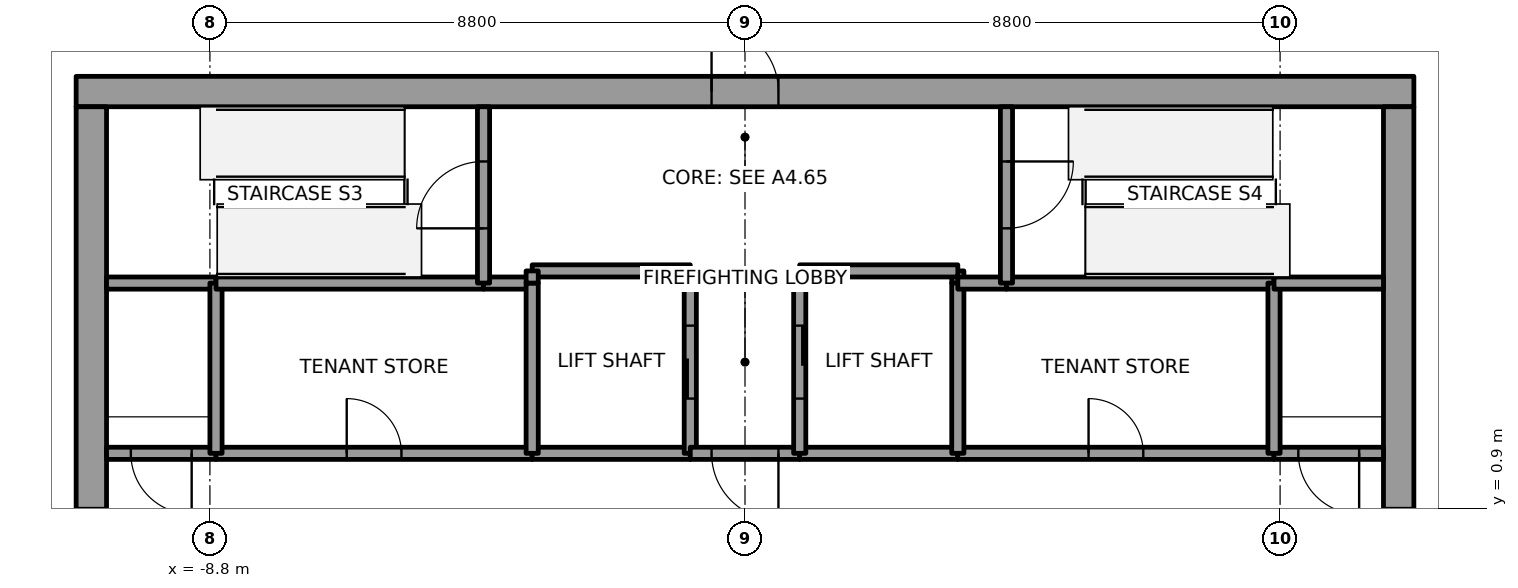
"""IFC4 building model, lengths in metres.
Left out: names, types, materials, properties, quantities, classifications, styles, units other than length and angle.
Written with IfcOpenShell. Run it as: python <this file> out.ifc"""

import sys

from ifc_helpers import new_model, si_unit, direction, frame, frame_2d, origin, place, context, subcontext, project, spatial, rectangle, extrude, element, fill, save


model = new_model("IFC4")
c1 = context("Model", 3, precision=1e-05, world=origin(), true_north=direction((0.0, 1.0)))
c2 = subcontext(c1, "Body", "Model", "MODEL_VIEW")
j1 = project(units=[si_unit("LENGTHUNIT", "METRE"), si_unit("PLANEANGLEUNIT", "RADIAN")], contexts=[c1])
p1 = place(None, origin())
s1 = spatial("IfcSite", under=j1, at=p1, CompositionType="ELEMENT")
p2 = place(p1, origin())
s2 = spatial("IfcBuilding", under=s1, at=p2, CompositionType="ELEMENT")
p3 = place(p2, frame((0.0, 0.0, 279.0)))
s3 = spatial("IfcBuildingStorey", under=s2, at=p3, CompositionType="ELEMENT", Elevation=279.0)
p4 = place(p3, frame((-11.0, 7.75, 0.0), z_axis=(0.0, 0.0, 1.0), x_axis=(1.0, 0.0, 0.0)))
e1 = element("IfcWall", 1, at=p4, inside=s3, PredefinedType="SHEAR", context=c2, shape_type="SweptSolid", body=[
    extrude(rectangle(XDim=22.0, YDim=0.5, at=frame_2d((11.0, 0.0))), origin(), (0.0, 0.0, 1.0), 4.0),
])
p5 = place(p4, frame((10.45, 0.0, 0.0)))
e2 = element("IfcOpeningElement", 2, at=p5, cuts=e1, PredefinedType="OPENING", context=c2, shape_type="SweptSolid", body=[
    extrude(rectangle(XDim=1.1, YDim=2.1, at=frame_2d((0.55, 1.05))), frame((0.0, 0.25, 0.0), z_axis=(0.0, -1.0, 0.0), x_axis=(1.0, 0.0, 0.0)), (0.0, 0.0, 1.0), 0.5),
])
p6 = place(p3, frame((-10.75, -7.5, 0.0), z_axis=(0.0, 0.0, 1.0), x_axis=(0.0, 1.0, 0.0)))
e3 = element("IfcWall", 3, at=p6, inside=s3, PredefinedType="SHEAR", context=c2, shape_type="SweptSolid", body=[
    extrude(rectangle(XDim=15.0, YDim=0.5, at=frame_2d((7.5, 0.0))), origin(), (0.0, 0.0, 1.0), 4.0),
])
p7 = place(p6, frame((6.6, 0.0, 0.0)))
e4 = element("IfcOpeningElement", 4, at=p7, cuts=e3, PredefinedType="OPENING", context=c2, shape_type="SweptSolid", body=[
    extrude(rectangle(XDim=1.8, YDim=2.1, at=frame_2d((0.9, 1.05))), frame((0.0, 0.25, 0.0), z_axis=(0.0, -1.0, 0.0), x_axis=(1.0, 0.0, 0.0)), (0.0, 0.0, 1.0), 0.5),
])
p8 = place(p3, frame((10.75, -7.5, 0.0), z_axis=(0.0, 0.0, 1.0), x_axis=(0.0, 1.0, 0.0)))
e5 = element("IfcWall", 5, at=p8, inside=s3, PredefinedType="SHEAR", context=c2, shape_type="SweptSolid", body=[
    extrude(rectangle(XDim=15.0, YDim=0.5, at=frame_2d((7.5, 0.0))), origin(), (0.0, 0.0, 1.0), 4.0),
])
p9 = place(p8, frame((6.6, 0.0, 0.0)))
e6 = element("IfcOpeningElement", 6, at=p9, cuts=e5, PredefinedType="OPENING", context=c2, shape_type="SweptSolid", body=[
    extrude(rectangle(XDim=1.8, YDim=2.1, at=frame_2d((0.9, 1.05))), frame((0.0, 0.25, 0.0), z_axis=(0.0, -1.0, 0.0), x_axis=(1.0, 0.0, 0.0)), (0.0, 0.0, 1.0), 0.5),
])
p10 = place(p3, frame((-8.7, 1.8, 0.0), z_axis=(0.0, 0.0, 1.0), x_axis=(-1.0, 0.0, 0.0)))
e7 = element("IfcWall", 7, at=p10, inside=s3, PredefinedType="SOLIDWALL", context=c2, shape_type="SweptSolid", body=[
    extrude(rectangle(XDim=1.8, YDim=0.2, at=frame_2d((0.9, 0.0))), origin(), (0.0, 0.0, 1.0), 3.85),
])
p11 = place(p10, frame((0.4, 0.0, 0.0)))
e8 = element("IfcOpeningElement", 8, at=p11, cuts=e7, PredefinedType="OPENING", context=c2, shape_type="SweptSolid", body=[
    extrude(rectangle(XDim=1.0, YDim=2.1, at=frame_2d((0.5, 1.05))), frame((0.0, 0.1, 0.0), z_axis=(0.0, -1.0, 0.0), x_axis=(1.0, 0.0, 0.0)), (0.0, 0.0, 1.0), 0.2),
])
p12 = place(p3, frame((-8.7, 4.6, 0.0), z_axis=(0.0, 0.0, 1.0), x_axis=(-1.0, 0.0, 0.0)))
e9 = element("IfcWall", 9, at=p12, inside=s3, PredefinedType="SOLIDWALL", context=c2, shape_type="SweptSolid", body=[
    extrude(rectangle(XDim=1.8, YDim=0.2, at=frame_2d((0.9, 0.0))), origin(), (0.0, 0.0, 1.0), 3.85),
])
p13 = place(p3, frame((-8.7, 1.8, 0.0), z_axis=(0.0, 0.0, 1.0), x_axis=(1.0, 0.0, 0.0)))
e10 = element("IfcWall", 10, at=p13, inside=s3, PredefinedType="SOLIDWALL", context=c2, shape_type="SweptSolid", body=[
    extrude(rectangle(XDim=5.2, YDim=0.2, at=frame_2d((2.6, 0.0))), origin(), (0.0, 0.0, 1.0), 3.85),
])
p14 = place(p13, frame((2.15, 0.0, 0.0)))
e11 = element("IfcOpeningElement", 11, at=p14, cuts=e10, PredefinedType="OPENING", context=c2, shape_type="SweptSolid", body=[
    extrude(rectangle(XDim=0.9, YDim=2.1, at=frame_2d((0.45, 1.05))), frame((0.0, 0.1, 0.0), z_axis=(0.0, -1.0, 0.0), x_axis=(1.0, 0.0, 0.0)), (0.0, 0.0, 1.0), 0.2),
])
p15 = place(p3, frame((-8.7, 4.6, 0.0), z_axis=(0.0, 0.0, 1.0), x_axis=(0.0, -1.0, 0.0)))
e12 = element("IfcWall", 12, at=p15, inside=s3, PredefinedType="SOLIDWALL", context=c2, shape_type="SweptSolid", body=[
    extrude(rectangle(XDim=2.8, YDim=0.2, at=frame_2d((1.4, 0.0))), origin(), (0.0, 0.0, 1.0), 3.85),
])
p16 = place(p3, frame((-4.3, 4.6, 0.0), z_axis=(0.0, 0.0, 1.0), x_axis=(-1.0, 0.0, 0.0)))
e13 = element("IfcWall", 13, at=p16, inside=s3, PredefinedType="SOLIDWALL", context=c2, shape_type="SweptSolid", body=[
    extrude(rectangle(XDim=4.4, YDim=0.2, at=frame_2d((2.2, 0.0))), origin(), (0.0, 0.0, 1.0), 3.85),
])
p17 = place(p3, frame((-3.5, 4.6, 0.0), z_axis=(0.0, 0.0, 1.0), x_axis=(-1.0, 0.0, 0.0)))
e14 = element("IfcWall", 14, at=p17, inside=s3, PredefinedType="SOLIDWALL", context=c2, shape_type="SweptSolid", body=[
    extrude(rectangle(XDim=0.8, YDim=0.2, at=frame_2d((0.4, 0.0))), origin(), (0.0, 0.0, 1.0), 3.85),
])
p18 = place(p3, frame((-4.3, 4.6, 0.0), z_axis=(0.0, 0.0, 1.0), x_axis=(0.0, 1.0, 0.0)))
e15 = element("IfcWall", 15, at=p18, inside=s3, PredefinedType="SOLIDWALL", context=c2, shape_type="SweptSolid", body=[
    extrude(rectangle(XDim=2.9, YDim=0.2, at=frame_2d((1.45, 0.0))), origin(), (0.0, 0.0, 1.0), 3.85),
])
p19 = place(p18, frame((0.9, 0.0, 0.0)))
e16 = element("IfcOpeningElement", 16, at=p19, cuts=e15, PredefinedType="OPENING", context=c2, shape_type="SweptSolid", body=[
    extrude(rectangle(XDim=1.1, YDim=2.1, at=frame_2d((0.55, 1.05))), frame((0.0, 0.1, 0.0), z_axis=(0.0, -1.0, 0.0), x_axis=(1.0, 0.0, 0.0)), (0.0, 0.0, 1.0), 0.2),
])
p20 = place(p3, frame((-0.9, 1.8, 0.0), z_axis=(0.0, 0.0, 1.0), x_axis=(-1.0, 0.0, 0.0)))
e17 = element("IfcWall", 17, at=p20, inside=s3, PredefinedType="SOLIDWALL", context=c2, shape_type="SweptSolid", body=[
    extrude(rectangle(XDim=2.6, YDim=0.2, at=frame_2d((1.3, 0.0))), origin(), (0.0, 0.0, 1.0), 3.85),
])
p21 = place(p3, frame((-3.5, 1.8, 0.0), z_axis=(0.0, 0.0, 1.0), x_axis=(0.0, 1.0, 0.0)))
e18 = element("IfcWall", 18, at=p21, inside=s3, PredefinedType="SOLIDWALL", context=c2, shape_type="SweptSolid", body=[
    extrude(rectangle(XDim=2.8, YDim=0.2, at=frame_2d((1.4, 0.0))), origin(), (0.0, 0.0, 1.0), 3.85),
])
p22 = place(p3, frame((-0.9, 1.8, 0.0), z_axis=(0.0, 0.0, 1.0), x_axis=(0.0, 1.0, 0.0)))
e19 = element("IfcWall", 19, at=p22, inside=s3, PredefinedType="SOLIDWALL", context=c2, shape_type="SweptSolid", body=[
    extrude(rectangle(XDim=3.0, YDim=0.2, at=frame_2d((1.5, 0.0))), origin(), (0.0, 0.0, 1.0), 3.85),
])
p23 = place(p22, frame((0.9, 0.0, 0.0)))
e20 = element("IfcOpeningElement", 20, at=p23, cuts=e19, PredefinedType="OPENING", context=c2, shape_type="SweptSolid", body=[
    extrude(rectangle(XDim=1.2, YDim=2.1, at=frame_2d((0.6, 1.05))), frame((0.0, 0.1, 0.0), z_axis=(0.0, -1.0, 0.0), x_axis=(1.0, 0.0, 0.0)), (0.0, 0.0, 1.0), 0.2),
])
p24 = place(p3, frame((-0.9, 4.8, 0.0), z_axis=(0.0, 0.0, 1.0), x_axis=(-1.0, 0.0, 0.0)))
e21 = element("IfcWall", 21, at=p24, inside=s3, PredefinedType="SOLIDWALL", context=c2, shape_type="SweptSolid", body=[
    extrude(rectangle(XDim=2.6, YDim=0.2, at=frame_2d((1.3, 0.0))), origin(), (0.0, 0.0, 1.0), 3.85),
])
p25 = place(p3, frame((-3.5, 4.8, 0.0), z_axis=(0.0, 0.0, 1.0), x_axis=(0.0, -1.0, 0.0)))
e22 = element("IfcWall", 22, at=p25, inside=s3, PredefinedType="SOLIDWALL", context=c2, shape_type="SweptSolid", body=[
    extrude(rectangle(XDim=0.2, YDim=0.2, at=frame_2d((0.1, 0.0))), origin(), (0.0, 0.0, 1.0), 3.85),
])
p26 = place(p3, frame((0.9, 1.8, 0.0), z_axis=(0.0, 0.0, 1.0), x_axis=(-1.0, 0.0, 0.0)))
e23 = element("IfcWall", 23, at=p26, inside=s3, PredefinedType="SOLIDWALL", context=c2, shape_type="SweptSolid", body=[
    extrude(rectangle(XDim=1.8, YDim=0.2, at=frame_2d((0.9, 0.0))), origin(), (0.0, 0.0, 1.0), 3.85),
])
p27 = place(p26, frame((0.35, 0.0, 0.0)))
e24 = element("IfcOpeningElement", 24, at=p27, cuts=e23, PredefinedType="OPENING", context=c2, shape_type="SweptSolid", body=[
    extrude(rectangle(XDim=1.1, YDim=2.1, at=frame_2d((0.55, 1.05))), frame((0.0, 0.1, 0.0), z_axis=(0.0, -1.0, 0.0), x_axis=(1.0, 0.0, 0.0)), (0.0, 0.0, 1.0), 0.2),
])
p28 = place(p3, frame((3.5, 1.8, 0.0), z_axis=(0.0, 0.0, 1.0), x_axis=(-1.0, 0.0, 0.0)))
e25 = element("IfcWall", 25, at=p28, inside=s3, PredefinedType="SOLIDWALL", context=c2, shape_type="SweptSolid", body=[
    extrude(rectangle(XDim=2.6, YDim=0.2, at=frame_2d((1.3, 0.0))), origin(), (0.0, 0.0, 1.0), 3.85),
])
p29 = place(p3, frame((3.5, 4.6, 0.0), z_axis=(0.0, 0.0, 1.0), x_axis=(0.0, 1.0, 0.0)))
e26 = element("IfcWall", 26, at=p29, inside=s3, PredefinedType="SOLIDWALL", context=c2, shape_type="SweptSolid", body=[
    extrude(rectangle(XDim=0.2, YDim=0.2, at=frame_2d((0.1, 0.0))), origin(), (0.0, 0.0, 1.0), 3.85),
])
p30 = place(p3, frame((3.5, 4.8, 0.0), z_axis=(0.0, 0.0, 1.0), x_axis=(-1.0, 0.0, 0.0)))
e27 = element("IfcWall", 27, at=p30, inside=s3, PredefinedType="SOLIDWALL", context=c2, shape_type="SweptSolid", body=[
    extrude(rectangle(XDim=2.6, YDim=0.2, at=frame_2d((1.3, 0.0))), origin(), (0.0, 0.0, 1.0), 3.85),
])
p31 = place(p3, frame((0.9, 4.8, 0.0), z_axis=(0.0, 0.0, 1.0), x_axis=(0.0, -1.0, 0.0)))
e28 = element("IfcWall", 28, at=p31, inside=s3, PredefinedType="SOLIDWALL", context=c2, shape_type="SweptSolid", body=[
    extrude(rectangle(XDim=3.0, YDim=0.2, at=frame_2d((1.5, 0.0))), origin(), (0.0, 0.0, 1.0), 3.85),
])
p32 = place(p31, frame((0.9, 0.0, 0.0)))
e29 = element("IfcOpeningElement", 29, at=p32, cuts=e28, PredefinedType="OPENING", context=c2, shape_type="SweptSolid", body=[
    extrude(rectangle(XDim=1.2, YDim=2.1, at=frame_2d((0.6, 1.05))), frame((0.0, 0.1, 0.0), z_axis=(0.0, -1.0, 0.0), x_axis=(1.0, 0.0, 0.0)), (0.0, 0.0, 1.0), 0.2),
])
p33 = place(p3, frame((3.5, 1.8, 0.0), z_axis=(0.0, 0.0, 1.0), x_axis=(1.0, 0.0, 0.0)))
e30 = element("IfcWall", 30, at=p33, inside=s3, PredefinedType="SOLIDWALL", context=c2, shape_type="SweptSolid", body=[
    extrude(rectangle(XDim=5.2, YDim=0.2, at=frame_2d((2.6, 0.0))), origin(), (0.0, 0.0, 1.0), 3.85),
])
p34 = place(p33, frame((2.15, 0.0, 0.0)))
e31 = element("IfcOpeningElement", 31, at=p34, cuts=e30, PredefinedType="OPENING", context=c2, shape_type="SweptSolid", body=[
    extrude(rectangle(XDim=0.9, YDim=2.1, at=frame_2d((0.45, 1.05))), frame((0.0, 0.1, 0.0), z_axis=(0.0, -1.0, 0.0), x_axis=(1.0, 0.0, 0.0)), (0.0, 0.0, 1.0), 0.2),
])
p35 = place(p3, frame((3.5, 4.6, 0.0), z_axis=(0.0, 0.0, 1.0), x_axis=(0.0, -1.0, 0.0)))
e32 = element("IfcWall", 32, at=p35, inside=s3, PredefinedType="SOLIDWALL", context=c2, shape_type="SweptSolid", body=[
    extrude(rectangle(XDim=2.8, YDim=0.2, at=frame_2d((1.4, 0.0))), origin(), (0.0, 0.0, 1.0), 3.85),
])
p36 = place(p3, frame((4.3, 4.6, 0.0), z_axis=(0.0, 0.0, 1.0), x_axis=(-1.0, 0.0, 0.0)))
e33 = element("IfcWall", 33, at=p36, inside=s3, PredefinedType="SOLIDWALL", context=c2, shape_type="SweptSolid", body=[
    extrude(rectangle(XDim=0.8, YDim=0.2, at=frame_2d((0.4, 0.0))), origin(), (0.0, 0.0, 1.0), 3.85),
])
p37 = place(p3, frame((8.7, 4.6, 0.0), z_axis=(0.0, 0.0, 1.0), x_axis=(-1.0, 0.0, 0.0)))
e34 = element("IfcWall", 34, at=p37, inside=s3, PredefinedType="SOLIDWALL", context=c2, shape_type="SweptSolid", body=[
    extrude(rectangle(XDim=4.4, YDim=0.2, at=frame_2d((2.2, 0.0))), origin(), (0.0, 0.0, 1.0), 3.85),
])
p38 = place(p3, frame((4.3, 7.5, 0.0), z_axis=(0.0, 0.0, 1.0), x_axis=(0.0, -1.0, 0.0)))
e35 = element("IfcWall", 35, at=p38, inside=s3, PredefinedType="SOLIDWALL", context=c2, shape_type="SweptSolid", body=[
    extrude(rectangle(XDim=2.9, YDim=0.2, at=frame_2d((1.45, 0.0))), origin(), (0.0, 0.0, 1.0), 3.85),
])
p39 = place(p38, frame((0.9, 0.0, 0.0)))
e36 = element("IfcOpeningElement", 36, at=p39, cuts=e35, PredefinedType="OPENING", context=c2, shape_type="SweptSolid", body=[
    extrude(rectangle(XDim=1.1, YDim=2.1, at=frame_2d((0.55, 1.05))), frame((0.0, 0.1, 0.0), z_axis=(0.0, -1.0, 0.0), x_axis=(1.0, 0.0, 0.0)), (0.0, 0.0, 1.0), 0.2),
])
p40 = place(p3, frame((10.5, 1.8, 0.0), z_axis=(0.0, 0.0, 1.0), x_axis=(-1.0, 0.0, 0.0)))
e37 = element("IfcWall", 37, at=p40, inside=s3, PredefinedType="SOLIDWALL", context=c2, shape_type="SweptSolid", body=[
    extrude(rectangle(XDim=1.8, YDim=0.2, at=frame_2d((0.9, 0.0))), origin(), (0.0, 0.0, 1.0), 3.85),
])
p41 = place(p40, frame((0.4, 0.0, 0.0)))
e38 = element("IfcOpeningElement", 38, at=p41, cuts=e37, PredefinedType="OPENING", context=c2, shape_type="SweptSolid", body=[
    extrude(rectangle(XDim=1.0, YDim=2.1, at=frame_2d((0.5, 1.05))), frame((0.0, 0.1, 0.0), z_axis=(0.0, -1.0, 0.0), x_axis=(1.0, 0.0, 0.0)), (0.0, 0.0, 1.0), 0.2),
])
p42 = place(p3, frame((8.7, 1.8, 0.0), z_axis=(0.0, 0.0, 1.0), x_axis=(0.0, 1.0, 0.0)))
e39 = element("IfcWall", 39, at=p42, inside=s3, PredefinedType="SOLIDWALL", context=c2, shape_type="SweptSolid", body=[
    extrude(rectangle(XDim=2.8, YDim=0.2, at=frame_2d((1.4, 0.0))), origin(), (0.0, 0.0, 1.0), 3.85),
])
p43 = place(p3, frame((10.5, 4.6, 0.0), z_axis=(0.0, 0.0, 1.0), x_axis=(-1.0, 0.0, 0.0)))
e40 = element("IfcWall", 40, at=p43, inside=s3, PredefinedType="SOLIDWALL", context=c2, shape_type="SweptSolid", body=[
    extrude(rectangle(XDim=1.8, YDim=0.2, at=frame_2d((0.9, 0.0))), origin(), (0.0, 0.0, 1.0), 3.85),
])
p44 = place(p23, origin())
e41 = element("IfcDoor", 41, at=p44, inside=s3, OperationType="SLIDING_TO_LEFT", PredefinedType="DOOR", context=c2, shape_type="SweptSolid", body=[
    extrude(rectangle(XDim=1.2, YDim=2.1, at=frame_2d((0.6, 1.05))), frame((0.0, 0.025, 0.0), z_axis=(0.0, -1.0, 0.0), x_axis=(1.0, 0.0, 0.0)), (0.0, 0.0, 1.0), 0.05),
])
fill(e20, e41)
p45 = place(p32, origin())
e42 = element("IfcDoor", 42, at=p45, inside=s3, OperationType="SLIDING_TO_RIGHT", PredefinedType="DOOR", context=c2, shape_type="SweptSolid", body=[
    extrude(rectangle(XDim=1.2, YDim=2.1, at=frame_2d((0.6, 1.05))), frame((0.0, 0.025, 0.0), z_axis=(0.0, -1.0, 0.0), x_axis=(1.0, 0.0, 0.0)), (0.0, 0.0, 1.0), 0.05),
])
fill(e29, e42)
p46 = place(p27, origin())
e43 = element("IfcDoor", 43, at=p46, inside=s3, OperationType="SINGLE_SWING_LEFT", PredefinedType="DOOR", context=c2, shape_type="SweptSolid", body=[
    extrude(rectangle(XDim=1.1, YDim=2.1, at=frame_2d((0.55, 1.05))), frame((0.0, 0.025, 0.0), z_axis=(0.0, -1.0, 0.0), x_axis=(1.0, 0.0, 0.0)), (0.0, 0.0, 1.0), 0.05),
])
fill(e24, e43)
p47 = place(p11, origin())
e44 = element("IfcDoor", 44, at=p47, inside=s3, OperationType="SINGLE_SWING_RIGHT", PredefinedType="DOOR", context=c2, shape_type="SweptSolid", body=[
    extrude(rectangle(XDim=1.0, YDim=2.1, at=frame_2d((0.5, 1.05))), frame((0.0, 0.025, 0.0), z_axis=(0.0, -1.0, 0.0), x_axis=(1.0, 0.0, 0.0)), (0.0, 0.0, 1.0), 0.05),
])
fill(e8, e44)
p48 = place(p41, origin())
e45 = element("IfcDoor", 45, at=p48, inside=s3, OperationType="SINGLE_SWING_LEFT", PredefinedType="DOOR", context=c2, shape_type="SweptSolid", body=[
    extrude(rectangle(XDim=1.0, YDim=2.1, at=frame_2d((0.5, 1.05))), frame((0.0, 0.025, 0.0), z_axis=(0.0, -1.0, 0.0), x_axis=(1.0, 0.0, 0.0)), (0.0, 0.0, 1.0), 0.05),
])
fill(e38, e45)
p49 = place(p19, origin())
e46 = element("IfcDoor", 46, at=p49, inside=s3, OperationType="SINGLE_SWING_RIGHT", PredefinedType="DOOR", context=c2, shape_type="SweptSolid", body=[
    extrude(rectangle(XDim=1.1, YDim=2.1, at=frame_2d((0.55, 1.05))), frame((0.0, 0.025, 0.0), z_axis=(0.0, -1.0, 0.0), x_axis=(1.0, 0.0, 0.0)), (0.0, 0.0, 1.0), 0.05),
])
fill(e16, e46)
p50 = place(p39, origin())
e47 = element("IfcDoor", 47, at=p50, inside=s3, OperationType="SINGLE_SWING_LEFT", PredefinedType="DOOR", context=c2, shape_type="SweptSolid", body=[
    extrude(rectangle(XDim=1.1, YDim=2.1, at=frame_2d((0.55, 1.05))), frame((0.0, 0.025, 0.0), z_axis=(0.0, -1.0, 0.0), x_axis=(1.0, 0.0, 0.0)), (0.0, 0.0, 1.0), 0.05),
])
fill(e36, e47)
p51 = place(p34, origin())
e48 = element("IfcDoor", 48, at=p51, inside=s3, OperationType="SINGLE_SWING_LEFT", PredefinedType="DOOR", context=c2, shape_type="SweptSolid", body=[
    extrude(rectangle(XDim=0.9, YDim=2.1, at=frame_2d((0.45, 1.05))), frame((0.0, 0.025, 0.0), z_axis=(0.0, -1.0, 0.0), x_axis=(1.0, 0.0, 0.0)), (0.0, 0.0, 1.0), 0.05),
])
fill(e31, e48)
p52 = place(p14, origin())
e49 = element("IfcDoor", 49, at=p52, inside=s3, OperationType="SINGLE_SWING_RIGHT", PredefinedType="DOOR", context=c2, shape_type="SweptSolid", body=[
    extrude(rectangle(XDim=0.9, YDim=2.1, at=frame_2d((0.45, 1.05))), frame((0.0, 0.025, 0.0), z_axis=(0.0, -1.0, 0.0), x_axis=(1.0, 0.0, 0.0)), (0.0, 0.0, 1.0), 0.05),
])
fill(e11, e49)
p53 = place(p7, origin())
e50 = element("IfcDoor", 50, at=p53, inside=s3, OperationType="DOUBLE_DOOR_SINGLE_SWING", PredefinedType="DOOR", context=c2, shape_type="SweptSolid", body=[
    extrude(rectangle(XDim=1.8, YDim=2.1, at=frame_2d((0.9, 1.05))), frame((0.0, 0.025, 0.0), z_axis=(0.0, -1.0, 0.0), x_axis=(1.0, 0.0, 0.0)), (0.0, 0.0, 1.0), 0.05),
])
fill(e4, e50)
p54 = place(p9, origin())
e51 = element("IfcDoor", 51, at=p54, inside=s3, OperationType="DOUBLE_DOOR_SINGLE_SWING", PredefinedType="DOOR", context=c2, shape_type="SweptSolid", body=[
    extrude(rectangle(XDim=1.8, YDim=2.1, at=frame_2d((0.9, 1.05))), frame((0.0, 0.025, 0.0), z_axis=(0.0, -1.0, 0.0), x_axis=(1.0, 0.0, 0.0)), (0.0, 0.0, 1.0), 0.05),
])
fill(e6, e51)
p55 = place(p5, origin())
e52 = element("IfcDoor", 52, at=p55, inside=s3, OperationType="SINGLE_SWING_LEFT", PredefinedType="DOOR", context=c2, shape_type="SweptSolid", body=[
    extrude(rectangle(XDim=1.1, YDim=2.1, at=frame_2d((0.55, 1.05))), frame((0.0, 0.025, 0.0), z_axis=(0.0, -1.0, 0.0), x_axis=(1.0, 0.0, 0.0)), (0.0, 0.0, 1.0), 0.05),
])
fill(e2, e52)
save(model, sys.argv[1])
